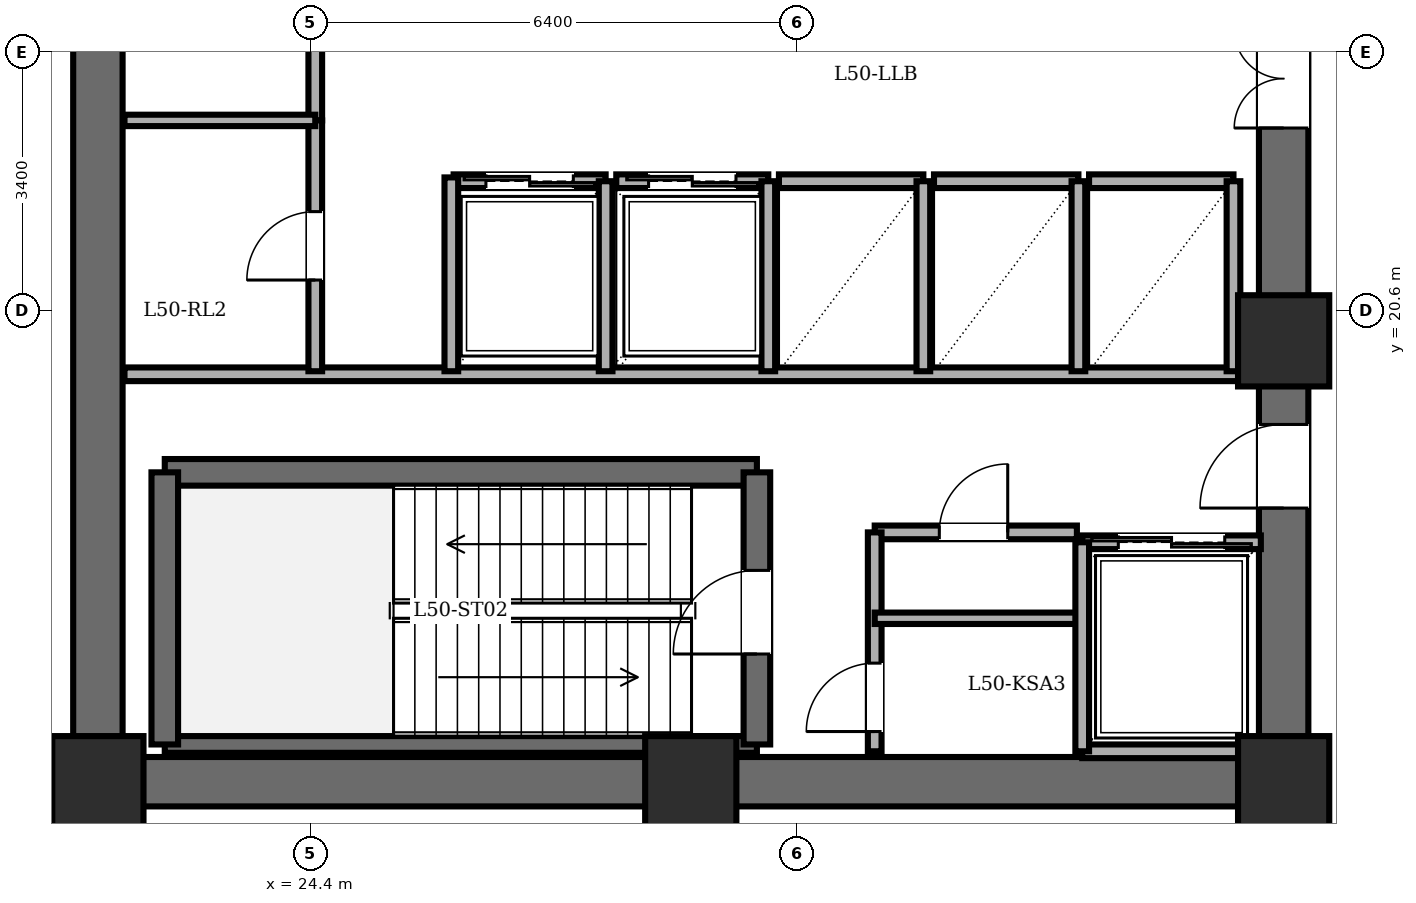
"""IFC4 building model, lengths in metres.
Left out: names, types, materials, properties, quantities, classifications, styles, units other than length and angle.
Written with IfcOpenShell. Run it as: python <this file> out.ifc"""

import sys

from ifc_helpers import new_model, si_unit, direction, frame, frame_2d, origin, origin_2d, place, context, subcontext, project, spatial, rectangle, extrude, element, fill, save


model = new_model("IFC4")
c1 = context("Model", 3, precision=1e-05, world=origin(), true_north=direction((0.0, 1.0)))
c2 = subcontext(c1, "Body", "Model", "MODEL_VIEW")
j1 = project(units=[si_unit("LENGTHUNIT", "METRE"), si_unit("PLANEANGLEUNIT", "RADIAN")], contexts=[c1])
p1 = place(None, origin())
s1 = spatial("IfcSite", under=j1, at=p1, CompositionType="ELEMENT")
p2 = place(p1, origin())
s2 = spatial("IfcBuilding", under=s1, at=p2, CompositionType="ELEMENT")
p3 = place(p2, frame((0.0, 0.0, 190.6)))
s3 = spatial("IfcBuildingStorey", under=s2, at=p3, CompositionType="ELEMENT", Elevation=190.6)
for number, where, z_axis, x_axis in (
    (1, (21.6, 14.4, 0.0), (0.0, 0.0, 1.0), (1.0, 0.0, 0.0)),
    (2, (29.4, 14.4, 0.0), (0.0, 0.0, 1.0), (1.0, 0.0, 0.0)),
    (3, (37.2, 14.4, 0.0), (0.0, 0.0, 1.0), (1.0, 0.0, 0.0)),
    (4, (37.2, 20.2, 0.0), (0.0, 0.0, 1.0), (1.0, 0.0, 0.0)),
):
    element("IfcColumn", number, at=place(p3, frame(where, z_axis=z_axis, x_axis=x_axis)), inside=s3, PredefinedType="COLUMN", context=c2, shape_type="SweptSolid", body=[
        extrude(rectangle(XDim=1.2, YDim=1.2, at=origin_2d()), origin(), (0.0, 0.0, 1.0), 5.6),
    ])
p4 = place(p3, frame((21.6, 14.4, 0.0), z_axis=(0.0, 0.0, 1.0), x_axis=(0.0, 1.0, 0.0)))
e5 = element("IfcWall", 5, at=p4, inside=s3, PredefinedType="SHEAR", context=c2, shape_type="SweptSolid", body=[
    extrude(rectangle(XDim=19.2, YDim=0.65, at=frame_2d((9.6, 0.0))), origin(), (0.0, 0.0, 1.0), 5.36),
])
p5 = place(p3, frame((37.2, 14.4, 0.0), z_axis=(0.0, 0.0, 1.0), x_axis=(-1.0, 0.0, 0.0)))
e6 = element("IfcWall", 6, at=p5, inside=s3, PredefinedType="SHEAR", context=c2, shape_type="SweptSolid", body=[
    extrude(rectangle(XDim=15.6, YDim=0.65, at=frame_2d((7.8, 0.0))), origin(), (0.0, 0.0, 1.0), 5.36),
])
p6 = place(p3, frame((37.2, 14.4, 0.0), z_axis=(0.0, 0.0, 1.0), x_axis=(0.0, 1.0, 0.0)))
e7 = element("IfcWall", 7, at=p6, inside=s3, PredefinedType="SHEAR", context=c2, shape_type="SweptSolid", body=[
    extrude(rectangle(XDim=19.2, YDim=0.65, at=frame_2d((9.6, 0.0))), origin(), (0.0, 0.0, 1.0), 5.36),
])
p7 = place(p6, frame((15.8, 0.0, 0.0)))
e8 = element("IfcOpeningElement", 8, at=p7, cuts=e7, PredefinedType="OPENING", context=c2, shape_type="SweptSolid", body=[
    extrude(rectangle(XDim=1.15, YDim=2.15, at=frame_2d((0.575, 1.075))), frame((0.0, 0.335, 0.0), z_axis=(0.0, -1.0, 0.0), x_axis=(1.0, 0.0, 0.0)), (0.0, 0.0, 1.0), 0.67),
])
p8 = place(p6, frame((3.6, 0.0, 0.0)))
e9 = element("IfcOpeningElement", 9, at=p8, cuts=e7, PredefinedType="OPENING", context=c2, shape_type="SweptSolid", body=[
    extrude(rectangle(XDim=1.1, YDim=2.15, at=frame_2d((0.55, 1.075))), frame((0.0, 0.335, 0.0), z_axis=(0.0, -1.0, 0.0), x_axis=(1.0, 0.0, 0.0)), (0.0, 0.0, 1.0), 0.67),
])
p9 = place(p6, frame((8.6, 0.0, 0.0)))
e10 = element("IfcOpeningElement", 10, at=p9, cuts=e7, PredefinedType="OPENING", context=c2, shape_type="SweptSolid", body=[
    extrude(rectangle(XDim=1.3, YDim=2.2, at=frame_2d((0.65, 1.1))), frame((0.0, 0.335, 0.0), z_axis=(0.0, -1.0, 0.0), x_axis=(1.0, 0.0, 0.0)), (0.0, 0.0, 1.0), 0.67),
])
p10 = place(p3, frame((22.48, 18.47, 0.0), z_axis=(0.0, 0.0, 1.0), x_axis=(1.0, 0.0, 0.0)))
e11 = element("IfcWall", 11, at=p10, inside=s3, PredefinedType="SOLIDWALL", context=c2, shape_type="SweptSolid", body=[
    extrude(rectangle(XDim=7.79, YDim=0.35, at=frame_2d((3.895, 0.0))), origin(), (0.0, 0.0, 1.0), 5.36),
])
p11 = place(p3, frame((22.48, 14.89, 0.0), z_axis=(0.0, 0.0, 1.0), x_axis=(1.0, 0.0, 0.0)))
e12 = element("IfcWall", 12, at=p11, inside=s3, PredefinedType="PARTITIONING", context=c2, shape_type="SweptSolid", body=[
    extrude(rectangle(XDim=7.79, YDim=0.22, at=frame_2d((3.895, 0.0))), origin(), (0.0, 0.0, 1.0), 5.36),
])
p12 = place(p3, frame((22.48, 14.89, 0.0), z_axis=(0.0, 0.0, 1.0), x_axis=(0.0, 1.0, 0.0)))
e13 = element("IfcWall", 13, at=p12, inside=s3, PredefinedType="SOLIDWALL", context=c2, shape_type="SweptSolid", body=[
    extrude(rectangle(XDim=3.58, YDim=0.35, at=frame_2d((1.79, 0.0))), origin(), (0.0, 0.0, 1.0), 5.36),
])
p13 = place(p3, frame((30.27, 14.89, 0.0), z_axis=(0.0, 0.0, 1.0), x_axis=(0.0, 1.0, 0.0)))
e14 = element("IfcWall", 14, at=p13, inside=s3, PredefinedType="SOLIDWALL", context=c2, shape_type="SweptSolid", body=[
    extrude(rectangle(XDim=3.58, YDim=0.35, at=frame_2d((1.79, 0.0))), origin(), (0.0, 0.0, 1.0), 5.36),
])
p14 = place(p13, frame((1.19, 0.0, 0.0)))
e15 = element("IfcOpeningElement", 15, at=p14, cuts=e14, PredefinedType="OPENING", context=c2, shape_type="SweptSolid", body=[
    extrude(rectangle(XDim=1.1, YDim=2.15, at=frame_2d((0.55, 1.075))), frame((0.0, 0.185, 0.0), z_axis=(0.0, -1.0, 0.0), x_axis=(1.0, 0.0, 0.0)), (0.0, 0.0, 1.0), 0.37),
])
p15 = place(p3, frame((21.95, 19.76, 0.0), z_axis=(0.0, 0.0, 1.0), x_axis=(1.0, 0.0, 0.0)))
e16 = element("IfcWall", 16, at=p15, inside=s3, PredefinedType="PARTITIONING", context=c2, shape_type="SweptSolid", body=[
    extrude(rectangle(XDim=14.87, YDim=0.18, at=frame_2d((7.435, 0.0))), origin(), (0.0, 0.0, 1.0), 5.36),
])
p16 = place(p3, frame((31.82, 17.68, 0.0), z_axis=(0.0, 0.0, 1.0), x_axis=(1.0, 0.0, 0.0)))
e17 = element("IfcWall", 17, at=p16, inside=s3, PredefinedType="PARTITIONING", context=c2, shape_type="SweptSolid", body=[
    extrude(rectangle(XDim=2.66, YDim=0.18, at=frame_2d((1.33, 0.0))), origin(), (0.0, 0.0, 1.0), 5.36),
])
p17 = place(p16, frame((0.85, 0.0, 0.0)))
e18 = element("IfcOpeningElement", 18, at=p17, cuts=e17, PredefinedType="OPENING", context=c2, shape_type="SweptSolid", body=[
    extrude(rectangle(XDim=0.9, YDim=2.05, at=frame_2d((0.45, 1.025))), frame((0.0, 0.1, 0.0), z_axis=(0.0, -1.0, 0.0), x_axis=(1.0, 0.0, 0.0)), (0.0, 0.0, 1.0), 0.2),
])
p18 = place(p3, frame((31.82, 14.8, 0.0), z_axis=(0.0, 0.0, 1.0), x_axis=(0.0, 1.0, 0.0)))
e19 = element("IfcWall", 19, at=p18, inside=s3, PredefinedType="PARTITIONING", context=c2, shape_type="SweptSolid", body=[
    extrude(rectangle(XDim=2.88, YDim=0.18, at=frame_2d((1.44, 0.0))), origin(), (0.0, 0.0, 1.0), 5.36),
])
p19 = place(p18, frame((0.26, 0.0, 0.0)))
e20 = element("IfcOpeningElement", 20, at=p19, cuts=e19, PredefinedType="OPENING", context=c2, shape_type="SweptSolid", body=[
    extrude(rectangle(XDim=0.9, YDim=2.05, at=frame_2d((0.45, 1.025))), frame((0.0, 0.1, 0.0), z_axis=(0.0, -1.0, 0.0), x_axis=(1.0, 0.0, 0.0)), (0.0, 0.0, 1.0), 0.2),
])
p20 = place(p3, frame((31.82, 16.55, 0.0), z_axis=(0.0, 0.0, 1.0), x_axis=(1.0, 0.0, 0.0)))
e21 = element("IfcWall", 21, at=p20, inside=s3, PredefinedType="PARTITIONING", context=c2, shape_type="SweptSolid", body=[
    extrude(rectangle(XDim=2.66, YDim=0.15, at=frame_2d((1.33, 0.0))), origin(), (0.0, 0.0, 1.0), 5.36),
])
p21 = place(p3, frame((34.55, 17.55, 0.0), z_axis=(0.0, 0.0, 1.0), x_axis=(1.0, 0.0, 0.0)))
e22 = element("IfcWall", 22, at=p21, inside=s3, PredefinedType="PARTITIONING", context=c2, shape_type="SweptSolid", body=[
    extrude(rectangle(XDim=2.35, YDim=0.18, at=frame_2d((1.175, 0.0))), origin(), (0.0, 0.0, 1.0), 5.36),
])
p22 = place(p21, frame((0.475, 0.0, 0.0)))
e23 = element("IfcOpeningElement", 23, at=p22, cuts=e22, PredefinedType="OPENING", context=c2, shape_type="SweptSolid", body=[
    extrude(rectangle(XDim=1.4, YDim=2.3, at=frame_2d((0.7, 1.15))), frame((0.0, 0.1, 0.0), z_axis=(0.0, -1.0, 0.0), x_axis=(1.0, 0.0, 0.0)), (0.0, 0.0, 1.0), 0.2),
])
p23 = place(p3, frame((36.9, 14.8, 0.0), z_axis=(0.0, 0.0, 1.0), x_axis=(-1.0, 0.0, 0.0)))
e24 = element("IfcWall", 24, at=p23, inside=s3, PredefinedType="PARTITIONING", context=c2, shape_type="SweptSolid", body=[
    extrude(rectangle(XDim=2.35, YDim=0.18, at=frame_2d((1.175, 0.0))), origin(), (0.0, 0.0, 1.0), 2.942),
])
p24 = place(p3, frame((34.55, 17.55, 0.0), z_axis=(0.0, 0.0, 1.0), x_axis=(0.0, -1.0, 0.0)))
e25 = element("IfcWall", 25, at=p24, inside=s3, PredefinedType="PARTITIONING", context=c2, shape_type="SweptSolid", body=[
    extrude(rectangle(XDim=2.75, YDim=0.18, at=frame_2d((1.375, 0.0))), origin(), (0.0, 0.0, 1.0), 5.36),
])
p25 = place(p3, frame((26.28, 22.3, 0.0), z_axis=(0.0, 0.0, 1.0), x_axis=(1.0, 0.0, 0.0)))
e26 = element("IfcWall", 26, at=p25, inside=s3, PredefinedType="PARTITIONING", context=c2, shape_type="SweptSolid", body=[
    extrude(rectangle(XDim=2.0, YDim=0.18, at=frame_2d((1.0, 0.0))), origin(), (0.0, 0.0, 1.0), 5.36),
])
p26 = place(p25, frame((0.425, 0.0, 0.0)))
e27 = element("IfcOpeningElement", 27, at=p26, cuts=e26, PredefinedType="OPENING", context=c2, shape_type="SweptSolid", body=[
    extrude(rectangle(XDim=1.15, YDim=2.2, at=frame_2d((0.575, 1.1))), frame((0.0, 0.1, 0.0), z_axis=(0.0, -1.0, 0.0), x_axis=(1.0, 0.0, 0.0)), (0.0, 0.0, 1.0), 0.2),
])
p27 = place(p3, frame((28.28, 19.8, 0.0), z_axis=(0.0, 0.0, 1.0), x_axis=(0.0, 1.0, 0.0)))
e28 = element("IfcWall", 28, at=p27, inside=s3, PredefinedType="PARTITIONING", context=c2, shape_type="SweptSolid", body=[
    extrude(rectangle(XDim=2.5, YDim=0.18, at=frame_2d((1.25, 0.0))), origin(), (0.0, 0.0, 1.0), 5.36),
])
p28 = place(p3, frame((28.42, 22.3, 0.0), z_axis=(0.0, 0.0, 1.0), x_axis=(1.0, 0.0, 0.0)))
e29 = element("IfcWall", 29, at=p28, inside=s3, PredefinedType="PARTITIONING", context=c2, shape_type="SweptSolid", body=[
    extrude(rectangle(XDim=2.0, YDim=0.18, at=frame_2d((1.0, 0.0))), origin(), (0.0, 0.0, 1.0), 5.36),
])
p29 = place(p28, frame((0.425, 0.0, 0.0)))
e30 = element("IfcOpeningElement", 30, at=p29, cuts=e29, PredefinedType="OPENING", context=c2, shape_type="SweptSolid", body=[
    extrude(rectangle(XDim=1.15, YDim=2.2, at=frame_2d((0.575, 1.1))), frame((0.0, 0.1, 0.0), z_axis=(0.0, -1.0, 0.0), x_axis=(1.0, 0.0, 0.0)), (0.0, 0.0, 1.0), 0.2),
])
p30 = place(p3, frame((30.42, 19.8, 0.0), z_axis=(0.0, 0.0, 1.0), x_axis=(0.0, 1.0, 0.0)))
e31 = element("IfcWall", 31, at=p30, inside=s3, PredefinedType="PARTITIONING", context=c2, shape_type="SweptSolid", body=[
    extrude(rectangle(XDim=2.5, YDim=0.18, at=frame_2d((1.25, 0.0))), origin(), (0.0, 0.0, 1.0), 5.36),
])
p31 = place(p3, frame((30.56, 22.3, 0.0), z_axis=(0.0, 0.0, 1.0), x_axis=(1.0, 0.0, 0.0)))
e32 = element("IfcWall", 32, at=p31, inside=s3, PredefinedType="PARTITIONING", context=c2, shape_type="SweptSolid", body=[
    extrude(rectangle(XDim=1.9, YDim=0.18, at=frame_2d((0.95, 0.0))), origin(), (0.0, 0.0, 1.0), 5.36),
])
p32 = place(p3, frame((32.46, 19.8, 0.0), z_axis=(0.0, 0.0, 1.0), x_axis=(0.0, 1.0, 0.0)))
e33 = element("IfcWall", 33, at=p32, inside=s3, PredefinedType="PARTITIONING", context=c2, shape_type="SweptSolid", body=[
    extrude(rectangle(XDim=2.5, YDim=0.18, at=frame_2d((1.25, 0.0))), origin(), (0.0, 0.0, 1.0), 5.36),
])
p33 = place(p3, frame((32.6, 22.3, 0.0), z_axis=(0.0, 0.0, 1.0), x_axis=(1.0, 0.0, 0.0)))
e34 = element("IfcWall", 34, at=p33, inside=s3, PredefinedType="PARTITIONING", context=c2, shape_type="SweptSolid", body=[
    extrude(rectangle(XDim=1.9, YDim=0.18, at=frame_2d((0.95, 0.0))), origin(), (0.0, 0.0, 1.0), 5.36),
])
p34 = place(p3, frame((34.5, 19.8, 0.0), z_axis=(0.0, 0.0, 1.0), x_axis=(0.0, 1.0, 0.0)))
e35 = element("IfcWall", 35, at=p34, inside=s3, PredefinedType="PARTITIONING", context=c2, shape_type="SweptSolid", body=[
    extrude(rectangle(XDim=2.5, YDim=0.18, at=frame_2d((1.25, 0.0))), origin(), (0.0, 0.0, 1.0), 5.36),
])
p35 = place(p3, frame((34.64, 22.3, 0.0), z_axis=(0.0, 0.0, 1.0), x_axis=(1.0, 0.0, 0.0)))
e36 = element("IfcWall", 36, at=p35, inside=s3, PredefinedType="PARTITIONING", context=c2, shape_type="SweptSolid", body=[
    extrude(rectangle(XDim=1.9, YDim=0.18, at=frame_2d((0.95, 0.0))), origin(), (0.0, 0.0, 1.0), 5.36),
])
p36 = place(p3, frame((36.54, 19.8, 0.0), z_axis=(0.0, 0.0, 1.0), x_axis=(0.0, 1.0, 0.0)))
e37 = element("IfcWall", 37, at=p36, inside=s3, PredefinedType="PARTITIONING", context=c2, shape_type="SweptSolid", body=[
    extrude(rectangle(XDim=2.5, YDim=0.18, at=frame_2d((1.25, 0.0))), origin(), (0.0, 0.0, 1.0), 5.36),
])
p37 = place(p3, frame((24.46, 23.1, 0.0), z_axis=(0.0, 0.0, 1.0), x_axis=(0.0, 1.0, 0.0)))
e38 = element("IfcWall", 38, at=p37, inside=s3, PredefinedType="PARTITIONING", context=c2, shape_type="SweptSolid", body=[
    extrude(rectangle(XDim=4.4, YDim=0.18, at=frame_2d((2.2, 0.0))), origin(), (0.0, 0.0, 1.0), 5.36),
])
p38 = place(p37, frame((1.75, 0.0, 0.0)))
e39 = element("IfcOpeningElement", 39, at=p38, cuts=e38, PredefinedType="OPENING", context=c2, shape_type="SweptSolid", body=[
    extrude(rectangle(XDim=0.9, YDim=2.05, at=frame_2d((0.45, 1.025))), frame((0.0, 0.1, 0.0), z_axis=(0.0, -1.0, 0.0), x_axis=(1.0, 0.0, 0.0)), (0.0, 0.0, 1.0), 0.2),
])
p39 = place(p3, frame((24.46, 19.8, 0.0), z_axis=(0.0, 0.0, 1.0), x_axis=(0.0, 1.0, 0.0)))
e40 = element("IfcWall", 40, at=p39, inside=s3, PredefinedType="PARTITIONING", context=c2, shape_type="SweptSolid", body=[
    extrude(rectangle(XDim=3.3, YDim=0.18, at=frame_2d((1.65, 0.0))), origin(), (0.0, 0.0, 1.0), 5.36),
])
p40 = place(p39, frame((1.2, 0.0, 0.0)))
e41 = element("IfcOpeningElement", 41, at=p40, cuts=e40, PredefinedType="OPENING", context=c2, shape_type="SweptSolid", body=[
    extrude(rectangle(XDim=0.9, YDim=2.05, at=frame_2d((0.45, 1.025))), frame((0.0, 0.1, 0.0), z_axis=(0.0, -1.0, 0.0), x_axis=(1.0, 0.0, 0.0)), (0.0, 0.0, 1.0), 0.2),
])
p41 = place(p3, frame((21.95, 23.1, 0.0), z_axis=(0.0, 0.0, 1.0), x_axis=(1.0, 0.0, 0.0)))
e42 = element("IfcWall", 42, at=p41, inside=s3, PredefinedType="PARTITIONING", context=c2, shape_type="SweptSolid", body=[
    extrude(rectangle(XDim=2.51, YDim=0.15, at=frame_2d((1.255, 0.0))), origin(), (0.0, 0.0, 1.0), 5.36),
])
p42 = place(p3, frame((26.25, 19.8, 0.0), z_axis=(0.0, 0.0, 1.0), x_axis=(0.0, 1.0, 0.0)))
e43 = element("IfcWall", 43, at=p42, inside=s3, PredefinedType="PARTITIONING", context=c2, shape_type="SweptSolid", body=[
    extrude(rectangle(XDim=2.55, YDim=0.18, at=frame_2d((1.275, 0.0))), origin(), (0.0, 0.0, 1.0), 5.36),
])
p43 = place(p3, frame((13.8, 14.2, 0.0), z_axis=(0.0, 0.0, 1.0), x_axis=(1.0, 0.0, 0.0)))
e44 = element("IfcWall", 44, at=p43, inside=s3, PredefinedType="PARTITIONING", context=c2, shape_type="SweptSolid", body=[
    extrude(rectangle(XDim=7.6, YDim=0.22, at=frame_2d((3.8, 0.0))), origin(), (0.0, 0.0, 1.0), 5.36),
])
p44 = place(p14, origin())
e45 = element("IfcDoor", 45, at=p44, inside=s3, OperationType="SINGLE_SWING_LEFT", PredefinedType="DOOR", context=c2, shape_type="SweptSolid", body=[
    extrude(rectangle(XDim=1.1, YDim=2.15, at=frame_2d((0.55, 1.075))), frame((0.0, 0.025, 0.0), z_axis=(0.0, -1.0, 0.0), x_axis=(1.0, 0.0, 0.0)), (0.0, 0.0, 1.0), 0.05),
])
fill(e15, e45)
p45 = place(p8, origin())
e46 = element("IfcDoor", 46, at=p45, inside=s3, OperationType="SINGLE_SWING_LEFT", PredefinedType="DOOR", context=c2, shape_type="SweptSolid", body=[
    extrude(rectangle(XDim=1.1, YDim=2.15, at=frame_2d((0.55, 1.075))), frame((0.0, 0.025, 0.0), z_axis=(0.0, -1.0, 0.0), x_axis=(1.0, 0.0, 0.0)), (0.0, 0.0, 1.0), 0.05),
])
fill(e9, e46)
p46 = place(p17, origin())
e47 = element("IfcDoor", 47, at=p46, inside=s3, OperationType="SINGLE_SWING_RIGHT", PredefinedType="DOOR", context=c2, shape_type="SweptSolid", body=[
    extrude(rectangle(XDim=0.9, YDim=2.05, at=frame_2d((0.45, 1.025))), frame((0.0, 0.025, 0.0), z_axis=(0.0, -1.0, 0.0), x_axis=(1.0, 0.0, 0.0)), (0.0, 0.0, 1.0), 0.05),
])
fill(e18, e47)
p47 = place(p19, origin())
e48 = element("IfcDoor", 48, at=p47, inside=s3, OperationType="SINGLE_SWING_LEFT", PredefinedType="DOOR", context=c2, shape_type="SweptSolid", body=[
    extrude(rectangle(XDim=0.9, YDim=2.05, at=frame_2d((0.45, 1.025))), frame((0.0, 0.025, 0.0), z_axis=(0.0, -1.0, 0.0), x_axis=(1.0, 0.0, 0.0)), (0.0, 0.0, 1.0), 0.05),
])
fill(e20, e48)
p48 = place(p22, origin())
e49 = element("IfcDoor", 49, at=p48, inside=s3, OperationType="DOUBLE_DOOR_SLIDING", PredefinedType="DOOR", context=c2, shape_type="SweptSolid", body=[
    extrude(rectangle(XDim=1.4, YDim=2.3, at=frame_2d((0.7, 1.15))), frame((0.0, 0.025, 0.0), z_axis=(0.0, -1.0, 0.0), x_axis=(1.0, 0.0, 0.0)), (0.0, 0.0, 1.0), 0.05),
])
fill(e23, e49)
p49 = place(p26, origin())
e50 = element("IfcDoor", 50, at=p49, inside=s3, OperationType="DOUBLE_DOOR_SLIDING", PredefinedType="DOOR", context=c2, shape_type="SweptSolid", body=[
    extrude(rectangle(XDim=1.15, YDim=2.2, at=frame_2d((0.575, 1.1))), frame((0.0, 0.025, 0.0), z_axis=(0.0, -1.0, 0.0), x_axis=(1.0, 0.0, 0.0)), (0.0, 0.0, 1.0), 0.05),
])
fill(e27, e50)
p50 = place(p29, origin())
e51 = element("IfcDoor", 51, at=p50, inside=s3, OperationType="DOUBLE_DOOR_SLIDING", PredefinedType="DOOR", context=c2, shape_type="SweptSolid", body=[
    extrude(rectangle(XDim=1.15, YDim=2.2, at=frame_2d((0.575, 1.1))), frame((0.0, 0.025, 0.0), z_axis=(0.0, -1.0, 0.0), x_axis=(1.0, 0.0, 0.0)), (0.0, 0.0, 1.0), 0.05),
])
fill(e30, e51)
p51 = place(p40, origin())
e52 = element("IfcDoor", 52, at=p51, inside=s3, OperationType="SINGLE_SWING_LEFT", PredefinedType="DOOR", context=c2, shape_type="SweptSolid", body=[
    extrude(rectangle(XDim=0.9, YDim=2.05, at=frame_2d((0.45, 1.025))), frame((0.0, 0.025, 0.0), z_axis=(0.0, -1.0, 0.0), x_axis=(1.0, 0.0, 0.0)), (0.0, 0.0, 1.0), 0.05),
])
fill(e41, e52)
p52 = place(p9, origin())
e53 = element("IfcDoor", 53, at=p52, inside=s3, OperationType="DOUBLE_DOOR_SINGLE_SWING", PredefinedType="DOOR", context=c2, shape_type="SweptSolid", body=[
    extrude(rectangle(XDim=1.3, YDim=2.2, at=frame_2d((0.65, 1.1))), frame((0.0, 0.025, 0.0), z_axis=(0.0, -1.0, 0.0), x_axis=(1.0, 0.0, 0.0)), (0.0, 0.0, 1.0), 0.05),
])
fill(e10, e53)
save(model, sys.argv[1])
